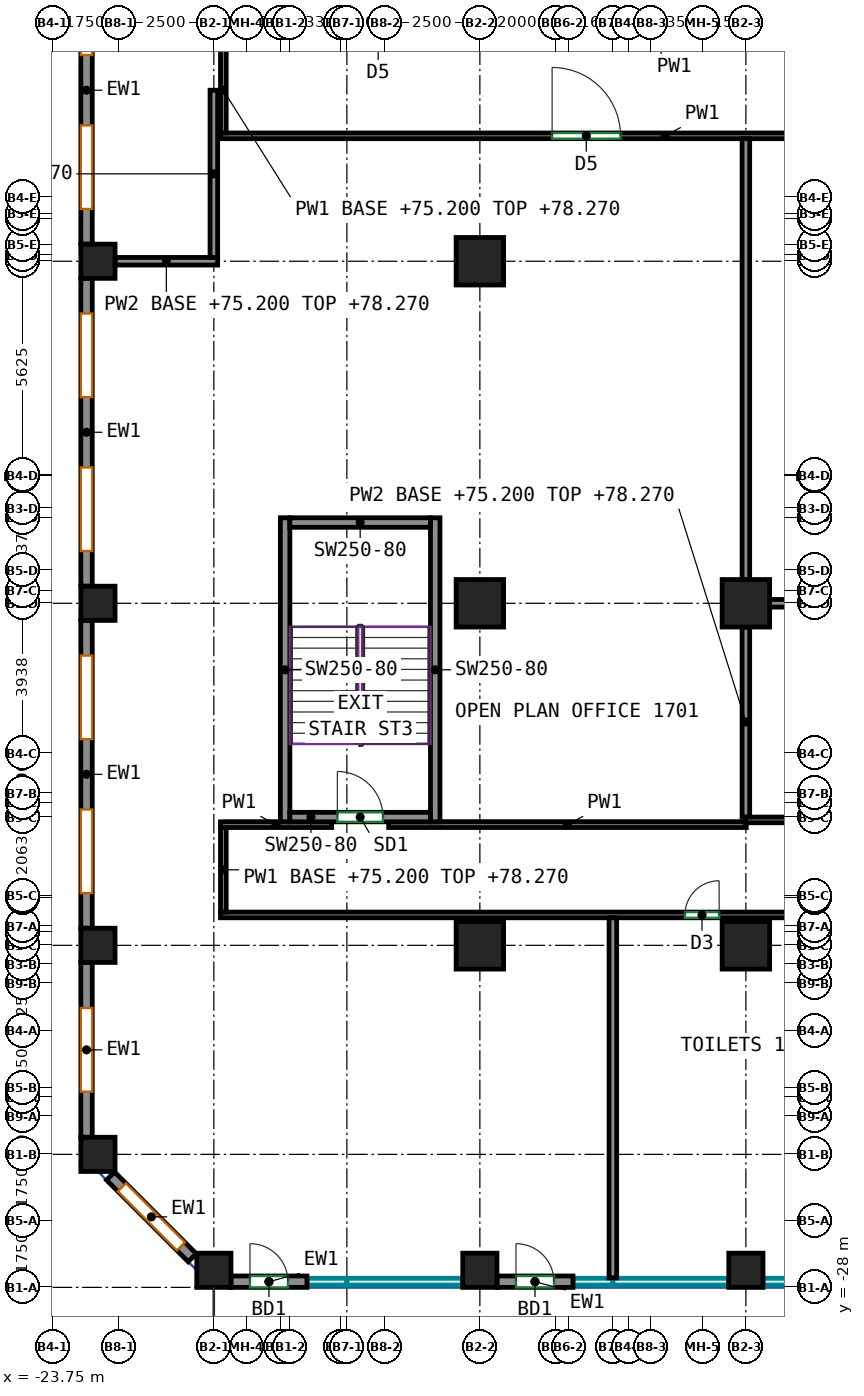
"""IFC4 building model, lengths in metres.
Left out: names, types, materials, properties, quantities, classifications, styles, units other than length and angle.
Written with IfcOpenShell. Run it as: python <this file> out.ifc"""

import sys

from ifc_helpers import new_model, si_unit, direction, frame, frame_2d, origin, origin_2d, place, context, subcontext, project, spatial, rectangle, extrude, source, transform, mapped, element, fill, save


model = new_model("IFC4")
c1 = context("Model", 3, precision=1e-05, world=origin(), true_north=direction((0.0, 1.0)))
c2 = subcontext(c1, "Body", "Model", "MODEL_VIEW")
j1 = project(units=[si_unit("LENGTHUNIT", "METRE"), si_unit("PLANEANGLEUNIT", "RADIAN")], contexts=[c1])
p1 = place(None, origin())
s1 = spatial("IfcSite", under=j1, at=p1, CompositionType="ELEMENT")
p2 = place(p1, origin())
s2 = spatial("IfcBuilding", under=s1, at=p2, CompositionType="ELEMENT")
p3 = place(p2, frame((0.0, 0.0, 75.2)))
s3 = spatial("IfcBuildingStorey", under=s2, at=p3, CompositionType="ELEMENT", Elevation=75.2)
m1 = source(origin(), c2, "Body", "SweptSolid", [
    extrude(rectangle(XDim=0.9, YDim=0.9, at=origin_2d()), origin(), (0.0, 0.0, 1.0), 3.72),
])
for number, where, z_axis, x_axis in (
    (1, (-22.55, -24.5, 0.0), (0.0, 0.0, 1.0), (1.0, 0.0, 0.0)),
    (2, (-22.55, -19.0, 0.0), (0.0, 0.0, 1.0), (1.0, 0.0, 0.0)),
    (3, (-22.55, -10.0, 0.0), (0.0, 0.0, 1.0), (1.0, 0.0, 0.0)),
    (4, (-22.55, -1.0, 0.0), (0.0, 0.0, 1.0), (1.0, 0.0, 0.0)),
    (5, (-19.5, -27.55, 0.0), (0.0, 0.0, 1.0), (1.0, 0.0, 0.0)),
    (6, (-12.5, -27.55, 0.0), (0.0, 0.0, 1.0), (1.0, 0.0, 0.0)),
):
    element("IfcColumn", number, at=place(p3, frame(where, z_axis=z_axis, x_axis=x_axis)), inside=s3, PredefinedType="COLUMN", context=c2, shape_type="MappedRepresentation", body=[
        mapped(m1, transform((0.0, 0.0, 0.0))),
    ])
m2 = source(origin(), c2, "Body", "SweptSolid", [
    extrude(rectangle(XDim=1.25, YDim=1.25, at=origin_2d()), origin(), (0.0, 0.0, 1.0), 3.72),
])
for number, where, z_axis, x_axis in (
    (7, (-12.5, -19.0, 0.0), (0.0, 0.0, 1.0), (1.0, 0.0, 0.0)),
    (8, (-12.5, -10.0, 0.0), (0.0, 0.0, 1.0), (1.0, 0.0, 0.0)),
    (9, (-12.5, -1.0, 0.0), (0.0, 0.0, 1.0), (1.0, 0.0, 0.0)),
):
    element("IfcColumn", number, at=place(p3, frame(where, z_axis=z_axis, x_axis=x_axis)), inside=s3, PredefinedType="COLUMN", context=c2, shape_type="MappedRepresentation", body=[
        mapped(m2, transform((0.0, 0.0, 0.0))),
    ])
p4 = place(p3, frame((-5.5, -27.55, 0.0), z_axis=(0.0, 0.0, 1.0), x_axis=(1.0, 0.0, 0.0)))
e10 = element("IfcColumn", 10, at=p4, inside=s3, PredefinedType="COLUMN", context=c2, shape_type="MappedRepresentation", body=[
    mapped(m1, transform((0.0, 0.0, 0.0))),
])
for number, where, z_axis, x_axis in (
    (11, (-5.5, -19.0, 0.0), (0.0, 0.0, 1.0), (1.0, 0.0, 0.0)),
    (12, (-5.5, -10.0, 0.0), (0.0, 0.0, 1.0), (1.0, 0.0, 0.0)),
):
    element("IfcColumn", number, at=place(p3, frame(where, z_axis=z_axis, x_axis=x_axis)), inside=s3, PredefinedType="COLUMN", context=c2, shape_type="MappedRepresentation", body=[
        mapped(m2, transform((0.0, 0.0, 0.0))),
    ])
m3 = source(origin(), c2, "Body", "SweptSolid", [
    extrude(rectangle(XDim=8.0, YDim=0.25, at=frame_2d((4.0, 0.0))), origin(), (0.0, 0.0, 1.0), 3.72),
])
for number, where, z_axis, x_axis in (
    (13, (-17.625, -15.75, 0.0), (0.0, 0.0, 1.0), (0.0, 1.0, 0.0)),
    (14, (-13.675, -15.75, 0.0), (0.0, 0.0, 1.0), (0.0, 1.0, 0.0)),
):
    element("IfcWall", number, at=place(p3, frame(where, z_axis=z_axis, x_axis=x_axis)), inside=s3, PredefinedType="SHEAR", context=c2, shape_type="MappedRepresentation", body=[
        mapped(m3, transform((0.0, 0.0, 0.0))),
    ])
m4 = source(origin(), c2, "Body", "SweptSolid", [
    extrude(rectangle(XDim=3.7, YDim=0.25, at=frame_2d((1.85, 0.0))), origin(), (0.0, 0.0, 1.0), 3.72),
])
p5 = place(p3, frame((-17.5, -15.625, 0.0), z_axis=(0.0, 0.0, 1.0), x_axis=(1.0, 0.0, 0.0)))
e15 = element("IfcWall", 15, at=p5, inside=s3, PredefinedType="SHEAR", context=c2, shape_type="MappedRepresentation", body=[
    mapped(m4, transform((0.0, 0.0, 0.0))),
])
p6 = place(p5, frame((1.25, 0.0, 0.0)))
e16 = element("IfcOpeningElement", 16, at=p6, cuts=e15, PredefinedType="OPENING", context=c2, shape_type="SweptSolid", body=[
    extrude(rectangle(XDim=1.2, YDim=2.1, at=frame_2d((0.6, 1.05))), frame((0.0, 0.135, 0.0), z_axis=(0.0, -1.0, 0.0), x_axis=(1.0, 0.0, 0.0)), (0.0, 0.0, 1.0), 0.27),
])
p7 = place(p3, frame((-17.5, -7.875, 0.0), z_axis=(0.0, 0.0, 1.0), x_axis=(1.0, 0.0, 0.0)))
e17 = element("IfcWall", 17, at=p7, inside=s3, PredefinedType="SHEAR", context=c2, shape_type="MappedRepresentation", body=[
    mapped(m4, transform((0.0, 0.0, 0.0))),
])
m5 = source(origin(), c2, "Body", "SweptSolid", [
    extrude(rectangle(XDim=2.0, YDim=0.3, at=frame_2d((1.0, 0.0))), origin(), (0.0, 0.0, 1.0), 3.72),
])
p8 = place(p3, frame((-19.05, -27.85, 0.0), z_axis=(0.0, 0.0, 1.0), x_axis=(1.0, 0.0, 0.0)))
e18 = element("IfcWall", 18, at=p8, inside=s3, PredefinedType="SOLIDWALL", context=c2, shape_type="MappedRepresentation", body=[
    mapped(m5, transform((0.0, 0.0, 0.0))),
])
p9 = place(p8, frame((0.5, 0.0, 0.0)))
e19 = element("IfcOpeningElement", 19, at=p9, cuts=e18, PredefinedType="OPENING", context=c2, shape_type="SweptSolid", body=[
    extrude(rectangle(XDim=1.0, YDim=2.1, at=frame_2d((0.5, 1.05))), frame((0.0, 0.16, 0.0), z_axis=(0.0, -1.0, 0.0), x_axis=(1.0, 0.0, 0.0)), (0.0, 0.0, 1.0), 0.32),
])
p10 = place(p3, frame((-12.05, -27.85, 0.0), z_axis=(0.0, 0.0, 1.0), x_axis=(1.0, 0.0, 0.0)))
e20 = element("IfcWall", 20, at=p10, inside=s3, PredefinedType="SOLIDWALL", context=c2, shape_type="MappedRepresentation", body=[
    mapped(m5, transform((0.0, 0.0, 0.0))),
])
p11 = place(p10, frame((0.5, 0.0, 0.0)))
e21 = element("IfcOpeningElement", 21, at=p11, cuts=e20, PredefinedType="OPENING", context=c2, shape_type="SweptSolid", body=[
    extrude(rectangle(XDim=1.0, YDim=2.1, at=frame_2d((0.5, 1.05))), frame((0.0, 0.16, 0.0), z_axis=(0.0, -1.0, 0.0), x_axis=(1.0, 0.0, 0.0)), (0.0, 0.0, 1.0), 0.32),
])
m6 = source(origin(), c2, "Body", "SweptSolid", [
    extrude(rectangle(XDim=8.1, YDim=0.3, at=frame_2d((4.05, 0.0))), origin(), (0.0, 0.0, 1.0), 3.72),
])
p12 = place(p3, frame((-22.85, 7.55, 0.0), z_axis=(0.0, 0.0, 1.0), x_axis=(0.0, -1.0, 0.0)))
e22 = element("IfcWall", 22, at=p12, inside=s3, PredefinedType="SOLIDWALL", context=c2, shape_type="MappedRepresentation", body=[
    mapped(m6, transform((0.0, 0.0, 0.0))),
])
p13 = place(p12, frame((0.925, 0.0, 0.7)))
e23 = element("IfcOpeningElement", 23, at=p13, cuts=e22, PredefinedType="OPENING", context=c2, shape_type="SweptSolid", body=[
    extrude(rectangle(XDim=2.2, YDim=2.25, at=frame_2d((1.1, 1.125))), frame((0.0, 0.16, 0.0), z_axis=(0.0, -1.0, 0.0), x_axis=(1.0, 0.0, 0.0)), (0.0, 0.0, 1.0), 0.32),
])
p14 = place(p12, frame((4.975, 0.0, 0.7)))
e24 = element("IfcOpeningElement", 24, at=p14, cuts=e22, PredefinedType="OPENING", context=c2, shape_type="SweptSolid", body=[
    extrude(rectangle(XDim=2.2, YDim=2.25, at=frame_2d((1.1, 1.125))), frame((0.0, 0.16, 0.0), z_axis=(0.0, -1.0, 0.0), x_axis=(1.0, 0.0, 0.0)), (0.0, 0.0, 1.0), 0.32),
])
p15 = place(p3, frame((-22.85, -1.45, 0.0), z_axis=(0.0, 0.0, 1.0), x_axis=(0.0, -1.0, 0.0)))
e25 = element("IfcWall", 25, at=p15, inside=s3, PredefinedType="SOLIDWALL", context=c2, shape_type="MappedRepresentation", body=[
    mapped(m6, transform((0.0, 0.0, 0.0))),
])
p16 = place(p15, frame((0.925, 0.0, 0.7)))
e26 = element("IfcOpeningElement", 26, at=p16, cuts=e25, PredefinedType="OPENING", context=c2, shape_type="SweptSolid", body=[
    extrude(rectangle(XDim=2.2, YDim=2.25, at=frame_2d((1.1, 1.125))), frame((0.0, 0.16, 0.0), z_axis=(0.0, -1.0, 0.0), x_axis=(1.0, 0.0, 0.0)), (0.0, 0.0, 1.0), 0.32),
])
p17 = place(p15, frame((4.975, 0.0, 0.7)))
e27 = element("IfcOpeningElement", 27, at=p17, cuts=e25, PredefinedType="OPENING", context=c2, shape_type="SweptSolid", body=[
    extrude(rectangle(XDim=2.2, YDim=2.25, at=frame_2d((1.1, 1.125))), frame((0.0, 0.16, 0.0), z_axis=(0.0, -1.0, 0.0), x_axis=(1.0, 0.0, 0.0)), (0.0, 0.0, 1.0), 0.32),
])
p18 = place(p3, frame((-22.85, -10.45, 0.0), z_axis=(0.0, 0.0, 1.0), x_axis=(0.0, -1.0, 0.0)))
e28 = element("IfcWall", 28, at=p18, inside=s3, PredefinedType="SOLIDWALL", context=c2, shape_type="MappedRepresentation", body=[
    mapped(m6, transform((0.0, 0.0, 0.0))),
])
p19 = place(p18, frame((0.925, 0.0, 0.7)))
e29 = element("IfcOpeningElement", 29, at=p19, cuts=e28, PredefinedType="OPENING", context=c2, shape_type="SweptSolid", body=[
    extrude(rectangle(XDim=2.2, YDim=2.25, at=frame_2d((1.1, 1.125))), frame((0.0, 0.16, 0.0), z_axis=(0.0, -1.0, 0.0), x_axis=(1.0, 0.0, 0.0)), (0.0, 0.0, 1.0), 0.32),
])
p20 = place(p18, frame((4.975, 0.0, 0.7)))
e30 = element("IfcOpeningElement", 30, at=p20, cuts=e28, PredefinedType="OPENING", context=c2, shape_type="SweptSolid", body=[
    extrude(rectangle(XDim=2.2, YDim=2.25, at=frame_2d((1.1, 1.125))), frame((0.0, 0.16, 0.0), z_axis=(0.0, -1.0, 0.0), x_axis=(1.0, 0.0, 0.0)), (0.0, 0.0, 1.0), 0.32),
])
m7 = source(origin(), c2, "Body", "SweptSolid", [
    extrude(rectangle(XDim=4.6, YDim=0.3, at=frame_2d((2.3, 0.0))), origin(), (0.0, 0.0, 1.0), 3.72),
])
p21 = place(p3, frame((-22.85, -19.45, 0.0), z_axis=(0.0, 0.0, 1.0), x_axis=(0.0, -1.0, 0.0)))
e31 = element("IfcWall", 31, at=p21, inside=s3, PredefinedType="SOLIDWALL", context=c2, shape_type="MappedRepresentation", body=[
    mapped(m7, transform((0.0, 0.0, 0.0))),
])
p22 = place(p21, frame((1.2, 0.0, 0.7)))
e32 = element("IfcOpeningElement", 32, at=p22, cuts=e31, PredefinedType="OPENING", context=c2, shape_type="SweptSolid", body=[
    extrude(rectangle(XDim=2.2, YDim=2.25, at=frame_2d((1.1, 1.125))), frame((0.0, 0.16, 0.0), z_axis=(0.0, -1.0, 0.0), x_axis=(1.0, 0.0, 0.0)), (0.0, 0.0, 1.0), 0.32),
])
m8 = source(origin(), c2, "Body", "SweptSolid", [
    extrude(rectangle(XDim=3.041, YDim=0.3, at=frame_2d((1.521, 0.0))), origin(), (0.0, 0.0, 1.0), 3.72),
])
p23 = place(p3, frame((-22.219, -25.069, 0.0), z_axis=(0.0, 0.0, 1.0), x_axis=(0.707106781187, -0.707106781187, 0.0)))
e33 = element("IfcWall", 33, at=p23, inside=s3, PredefinedType="SOLIDWALL", context=c2, shape_type="MappedRepresentation", body=[
    mapped(m8, transform((0.0, 0.0, 0.0))),
])
p24 = place(p23, frame((0.42, 0.0, 0.7)))
e34 = element("IfcOpeningElement", 34, at=p24, cuts=e33, PredefinedType="OPENING", context=c2, shape_type="SweptSolid", body=[
    extrude(rectangle(XDim=2.2, YDim=2.25, at=frame_2d((1.1, 1.125))), frame((0.0, 0.16, 0.0), z_axis=(0.0, -1.0, 0.0), x_axis=(1.0, 0.0, 0.0)), (0.0, 0.0, 1.0), 0.32),
])
p25 = place(p3, frame((-19.325, -18.2, 0.0), z_axis=(0.0, 0.0, 1.0), x_axis=(1.0, 0.0, 0.0)))
e35 = element("IfcWall", 35, at=p25, inside=s3, PredefinedType="PARTITIONING", context=c2, shape_type="SweptSolid", body=[
    extrude(rectangle(XDim=48.65, YDim=0.15, at=frame_2d((24.325, 0.0))), origin(), (0.0, 0.0, 1.0), 3.72),
])
p26 = place(p25, frame((12.221, 0.0, 0.0)))
e36 = element("IfcOpeningElement", 36, at=p26, cuts=e35, PredefinedType="OPENING", context=c2, shape_type="SweptSolid", body=[
    extrude(rectangle(XDim=0.9, YDim=2.1, at=frame_2d((0.45, 1.05))), frame((0.0, 0.085, 0.0), z_axis=(0.0, -1.0, 0.0), x_axis=(1.0, 0.0, 0.0)), (0.0, 0.0, 1.0), 0.17),
])
p27 = place(p25, frame((26.229, 0.0, 0.0)))
e37 = element("IfcOpeningElement", 37, at=p27, cuts=e35, PredefinedType="OPENING", context=c2, shape_type="SweptSolid", body=[
    extrude(rectangle(XDim=0.9, YDim=2.1, at=frame_2d((0.45, 1.05))), frame((0.0, 0.085, 0.0), z_axis=(0.0, -1.0, 0.0), x_axis=(1.0, 0.0, 0.0)), (0.0, 0.0, 1.0), 0.17),
])
p28 = place(p25, frame((38.029, 0.0, 0.0)))
e38 = element("IfcOpeningElement", 38, at=p28, cuts=e35, PredefinedType="OPENING", context=c2, shape_type="SweptSolid", body=[
    extrude(rectangle(XDim=0.9, YDim=2.1, at=frame_2d((0.45, 1.05))), frame((0.0, 0.085, 0.0), z_axis=(0.0, -1.0, 0.0), x_axis=(1.0, 0.0, 0.0)), (0.0, 0.0, 1.0), 0.17),
])
p29 = place(p3, frame((-19.25, -18.125, 0.0), z_axis=(0.0, 0.0, 1.0), x_axis=(0.0, 1.0, 0.0)))
e39 = element("IfcWall", 39, at=p29, inside=s3, PredefinedType="PARTITIONING", context=c2, shape_type="SweptSolid", body=[
    extrude(rectangle(XDim=2.225, YDim=0.15, at=frame_2d((1.113, 0.0))), origin(), (0.0, 0.0, 1.0), 3.07),
])
p30 = place(p3, frame((-14.9, -15.825, 0.0), z_axis=(0.0, 0.0, 1.0), x_axis=(1.0, 0.0, 0.0)))
e40 = element("IfcWall", 40, at=p30, inside=s3, PredefinedType="PARTITIONING", context=c2, shape_type="SweptSolid", body=[
    extrude(rectangle(XDim=9.41, YDim=0.15, at=frame_2d((4.705, 0.0))), origin(), (0.0, 0.0, 1.0), 3.72),
])
p31 = place(p3, frame((-19.325, -15.825, 0.0), z_axis=(0.0, 0.0, 1.0), x_axis=(1.0, 0.0, 0.0)))
e41 = element("IfcWall", 41, at=p31, inside=s3, PredefinedType="PARTITIONING", context=c2, shape_type="SweptSolid", body=[
    extrude(rectangle(XDim=2.925, YDim=0.15, at=frame_2d((1.462, 0.0))), origin(), (0.0, 0.0, 1.0), 3.72),
])
p32 = place(p3, frame((-19.325, 2.3, 0.0), z_axis=(0.0, 0.0, 1.0), x_axis=(1.0, 0.0, 0.0)))
e42 = element("IfcWall", 42, at=p32, inside=s3, PredefinedType="PARTITIONING", context=c2, shape_type="SweptSolid", body=[
    extrude(rectangle(XDim=23.4, YDim=0.15, at=frame_2d((11.7, 0.0))), origin(), (0.0, 0.0, 1.0), 3.72),
])
p33 = place(p32, frame((8.726, 0.0, 0.0)))
e43 = element("IfcOpeningElement", 43, at=p33, cuts=e42, PredefinedType="OPENING", context=c2, shape_type="SweptSolid", body=[
    extrude(rectangle(XDim=1.8, YDim=2.1, at=frame_2d((0.9, 1.05))), frame((0.0, 0.085, 0.0), z_axis=(0.0, -1.0, 0.0), x_axis=(1.0, 0.0, 0.0)), (0.0, 0.0, 1.0), 0.17),
])
p34 = place(p3, frame((-19.25, 2.375, 0.0), z_axis=(0.0, 0.0, 1.0), x_axis=(0.0, 1.0, 0.0)))
e44 = element("IfcWall", 44, at=p34, inside=s3, PredefinedType="PARTITIONING", context=c2, shape_type="SweptSolid", body=[
    extrude(rectangle(XDim=2.25, YDim=0.15, at=frame_2d((1.125, 0.0))), origin(), (0.0, 0.0, 1.0), 3.07),
])
p35 = place(p3, frame((-5.51, -15.7, 0.0), z_axis=(0.0, 0.0, 1.0), x_axis=(1.0, 0.0, 0.0)))
e45 = element("IfcWall", 45, at=p35, inside=s3, PredefinedType="PARTITIONING", context=c2, shape_type="SweptSolid", body=[
    extrude(rectangle(XDim=9.585, YDim=0.15, at=frame_2d((4.792, 0.0))), origin(), (0.0, 0.0, 1.0), 3.72),
])
p36 = place(p35, frame((1.21, 0.0, 0.0)))
e46 = element("IfcOpeningElement", 46, at=p36, cuts=e45, PredefinedType="OPENING", context=c2, shape_type="SweptSolid", body=[
    extrude(rectangle(XDim=0.9, YDim=2.1, at=frame_2d((0.45, 1.05))), frame((0.0, 0.085, 0.0), z_axis=(0.0, -1.0, 0.0), x_axis=(1.0, 0.0, 0.0)), (0.0, 0.0, 1.0), 0.17),
])
p37 = place(p3, frame((-19.4, -1.0, 0.0), z_axis=(0.0, 0.0, 1.0), x_axis=(-1.0, 0.0, 0.0)))
e47 = element("IfcWall", 47, at=p37, inside=s3, PredefinedType="PARTITIONING", context=c2, shape_type="SweptSolid", body=[
    extrude(rectangle(XDim=2.7, YDim=0.2, at=frame_2d((1.35, 0.0))), origin(), (0.0, 0.0, 1.0), 3.07),
])
p38 = place(p3, frame((-19.5, 3.5, 0.0), z_axis=(0.0, 0.0, 1.0), x_axis=(0.0, -1.0, 0.0)))
e48 = element("IfcWall", 48, at=p38, inside=s3, PredefinedType="PARTITIONING", context=c2, shape_type="SweptSolid", body=[
    extrude(rectangle(XDim=4.4, YDim=0.2, at=frame_2d((2.2, 0.0))), origin(), (0.0, 0.0, 1.0), 3.07),
])
p39 = place(p3, frame((-9.0, -27.75, 0.0), z_axis=(0.0, 0.0, 1.0), x_axis=(0.0, 1.0, 0.0)))
e49 = element("IfcWall", 49, at=p39, inside=s3, PredefinedType="PARTITIONING", context=c2, shape_type="SweptSolid", body=[
    extrude(rectangle(XDim=9.474, YDim=0.2, at=frame_2d((4.737, 0.0))), origin(), (0.0, 0.0, 1.0), 3.72),
])
p40 = place(p3, frame((-5.5, -15.624, 0.0), z_axis=(0.0, 0.0, 1.0), x_axis=(0.0, 1.0, 0.0)))
e50 = element("IfcWall", 50, at=p40, inside=s3, PredefinedType="PARTITIONING", context=c2, shape_type="SweptSolid", body=[
    extrude(rectangle(XDim=4.999, YDim=0.2, at=frame_2d((2.5, 0.0))), origin(), (0.0, 0.0, 1.0), 3.07),
])
p41 = place(p3, frame((-5.5, -9.375, 0.0), z_axis=(0.0, 0.0, 1.0), x_axis=(0.0, 1.0, 0.0)))
e51 = element("IfcWall", 51, at=p41, inside=s3, PredefinedType="PARTITIONING", context=c2, shape_type="SweptSolid", body=[
    extrude(rectangle(XDim=11.599, YDim=0.2, at=frame_2d((5.8, 0.0))), origin(), (0.0, 0.0, 1.0), 3.72),
])
p42 = place(p3, frame((-4.875, -10.0, 0.0), z_axis=(0.0, 0.0, 1.0), x_axis=(1.0, 0.0, 0.0)))
e52 = element("IfcWall", 52, at=p42, inside=s3, PredefinedType="PARTITIONING", context=c2, shape_type="SweptSolid", body=[
    extrude(rectangle(XDim=5.75, YDim=0.2, at=frame_2d((2.875, 0.0))), origin(), (0.0, 0.0, 1.0), 3.72),
])
p43 = place(p9, origin())
e53 = element("IfcDoor", 53, at=p43, inside=s3, OperationType="SINGLE_SWING_LEFT", PredefinedType="DOOR", context=c2, shape_type="SweptSolid", body=[
    extrude(rectangle(XDim=1.0, YDim=2.1, at=frame_2d((0.5, 1.05))), frame((0.0, 0.025, 0.0), z_axis=(0.0, -1.0, 0.0), x_axis=(1.0, 0.0, 0.0)), (0.0, 0.0, 1.0), 0.05),
])
fill(e19, e53)
p44 = place(p11, origin())
e54 = element("IfcDoor", 54, at=p44, inside=s3, OperationType="SINGLE_SWING_LEFT", PredefinedType="DOOR", context=c2, shape_type="SweptSolid", body=[
    extrude(rectangle(XDim=1.0, YDim=2.1, at=frame_2d((0.5, 1.05))), frame((0.0, 0.025, 0.0), z_axis=(0.0, -1.0, 0.0), x_axis=(1.0, 0.0, 0.0)), (0.0, 0.0, 1.0), 0.05),
])
fill(e21, e54)
p45 = place(p13, origin())
e55 = element("IfcWindow", 55, at=p45, inside=s3, PartitioningType="SINGLE_PANEL", PredefinedType="WINDOW", context=c2, shape_type="SweptSolid", body=[
    extrude(rectangle(XDim=2.2, YDim=2.25, at=frame_2d((1.1, 1.125))), frame((0.0, 0.03, 0.0), z_axis=(0.0, -1.0, 0.0), x_axis=(1.0, 0.0, 0.0)), (0.0, 0.0, 1.0), 0.06),
])
fill(e23, e55)
p46 = place(p14, origin())
e56 = element("IfcWindow", 56, at=p46, inside=s3, PartitioningType="SINGLE_PANEL", PredefinedType="WINDOW", context=c2, shape_type="SweptSolid", body=[
    extrude(rectangle(XDim=2.2, YDim=2.25, at=frame_2d((1.1, 1.125))), frame((0.0, 0.03, 0.0), z_axis=(0.0, -1.0, 0.0), x_axis=(1.0, 0.0, 0.0)), (0.0, 0.0, 1.0), 0.06),
])
fill(e24, e56)
p47 = place(p16, origin())
e57 = element("IfcWindow", 57, at=p47, inside=s3, PartitioningType="SINGLE_PANEL", PredefinedType="WINDOW", context=c2, shape_type="SweptSolid", body=[
    extrude(rectangle(XDim=2.2, YDim=2.25, at=frame_2d((1.1, 1.125))), frame((0.0, 0.03, 0.0), z_axis=(0.0, -1.0, 0.0), x_axis=(1.0, 0.0, 0.0)), (0.0, 0.0, 1.0), 0.06),
])
fill(e26, e57)
p48 = place(p17, origin())
e58 = element("IfcWindow", 58, at=p48, inside=s3, PartitioningType="SINGLE_PANEL", PredefinedType="WINDOW", context=c2, shape_type="SweptSolid", body=[
    extrude(rectangle(XDim=2.2, YDim=2.25, at=frame_2d((1.1, 1.125))), frame((0.0, 0.03, 0.0), z_axis=(0.0, -1.0, 0.0), x_axis=(1.0, 0.0, 0.0)), (0.0, 0.0, 1.0), 0.06),
])
fill(e27, e58)
p49 = place(p19, origin())
e59 = element("IfcWindow", 59, at=p49, inside=s3, PartitioningType="SINGLE_PANEL", PredefinedType="WINDOW", context=c2, shape_type="SweptSolid", body=[
    extrude(rectangle(XDim=2.2, YDim=2.25, at=frame_2d((1.1, 1.125))), frame((0.0, 0.03, 0.0), z_axis=(0.0, -1.0, 0.0), x_axis=(1.0, 0.0, 0.0)), (0.0, 0.0, 1.0), 0.06),
])
fill(e29, e59)
p50 = place(p20, origin())
e60 = element("IfcWindow", 60, at=p50, inside=s3, PartitioningType="SINGLE_PANEL", PredefinedType="WINDOW", context=c2, shape_type="SweptSolid", body=[
    extrude(rectangle(XDim=2.2, YDim=2.25, at=frame_2d((1.1, 1.125))), frame((0.0, 0.03, 0.0), z_axis=(0.0, -1.0, 0.0), x_axis=(1.0, 0.0, 0.0)), (0.0, 0.0, 1.0), 0.06),
])
fill(e30, e60)
p51 = place(p22, origin())
e61 = element("IfcWindow", 61, at=p51, inside=s3, PartitioningType="SINGLE_PANEL", PredefinedType="WINDOW", context=c2, shape_type="SweptSolid", body=[
    extrude(rectangle(XDim=2.2, YDim=2.25, at=frame_2d((1.1, 1.125))), frame((0.0, 0.03, 0.0), z_axis=(0.0, -1.0, 0.0), x_axis=(1.0, 0.0, 0.0)), (0.0, 0.0, 1.0), 0.06),
])
fill(e32, e61)
p52 = place(p24, origin())
e62 = element("IfcWindow", 62, at=p52, inside=s3, PartitioningType="SINGLE_PANEL", PredefinedType="WINDOW", context=c2, shape_type="SweptSolid", body=[
    extrude(rectangle(XDim=2.2, YDim=2.25, at=frame_2d((1.1, 1.125))), frame((0.0, 0.03, 0.0), z_axis=(0.0, -1.0, 0.0), x_axis=(1.0, 0.0, 0.0)), (0.0, 0.0, 1.0), 0.06),
])
fill(e34, e62)
p53 = place(p6, origin())
e63 = element("IfcDoor", 63, at=p53, inside=s3, OperationType="DOUBLE_DOOR_SINGLE_SWING", PredefinedType="DOOR", context=c2, shape_type="SweptSolid", body=[
    extrude(rectangle(XDim=1.2, YDim=2.1, at=frame_2d((0.6, 1.05))), frame((0.0, 0.025, 0.0), z_axis=(0.0, -1.0, 0.0), x_axis=(1.0, 0.0, 0.0)), (0.0, 0.0, 1.0), 0.05),
])
fill(e16, e63)
p54 = place(p26, origin())
e64 = element("IfcDoor", 64, at=p54, inside=s3, OperationType="SINGLE_SWING_RIGHT", PredefinedType="DOOR", context=c2, shape_type="SweptSolid", body=[
    extrude(rectangle(XDim=0.9, YDim=2.1, at=frame_2d((0.45, 1.05))), frame((0.0, 0.025, 0.0), z_axis=(0.0, -1.0, 0.0), x_axis=(1.0, 0.0, 0.0)), (0.0, 0.0, 1.0), 0.05),
])
fill(e36, e64)
p55 = place(p33, origin())
e65 = element("IfcDoor", 65, at=p55, inside=s3, OperationType="DOUBLE_DOOR_SINGLE_SWING", PredefinedType="DOOR", context=c2, shape_type="SweptSolid", body=[
    extrude(rectangle(XDim=1.8, YDim=2.1, at=frame_2d((0.9, 1.05))), frame((0.0, 0.025, 0.0), z_axis=(0.0, -1.0, 0.0), x_axis=(1.0, 0.0, 0.0)), (0.0, 0.0, 1.0), 0.05),
])
fill(e43, e65)
save(model, sys.argv[1])
